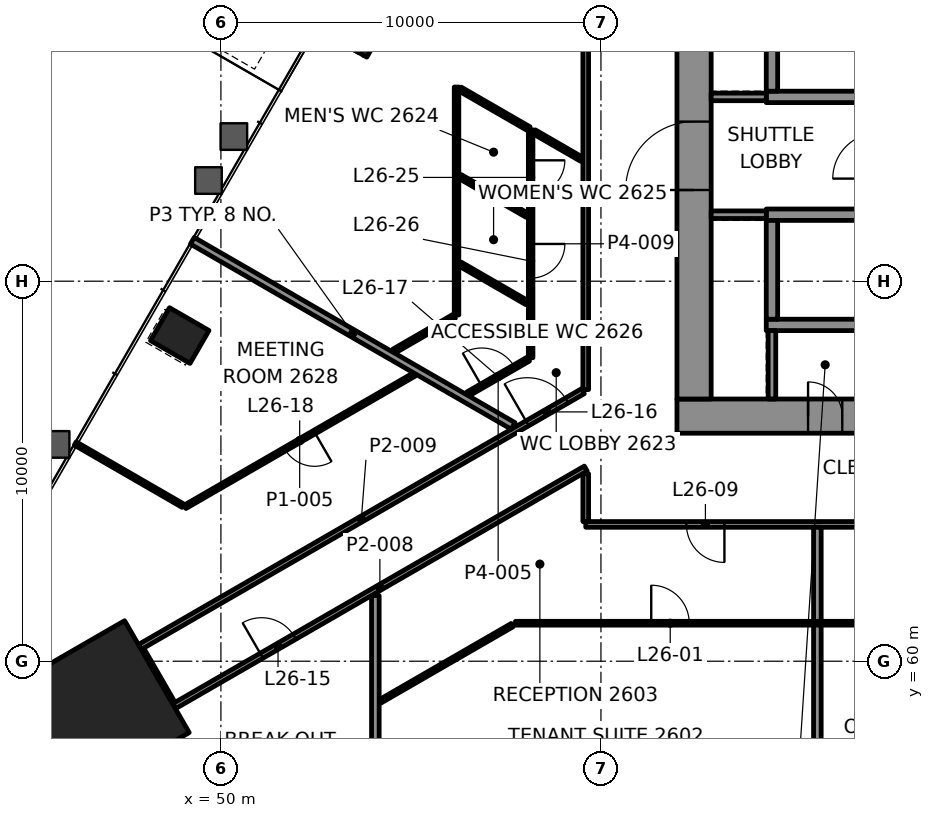
"""IFC4 building model, lengths in metres.
Left out: names, types, materials, properties, quantities, classifications, styles, units other than length and angle.
Written with IfcOpenShell. Run it as: python <this file> out.ifc"""

import sys

from ifc_helpers import new_model, si_unit, direction, frame, frame_2d, origin, origin_2d, place, context, subcontext, project, spatial, rectangle, extrude, element, fill, save


model = new_model("IFC4")
c1 = context("Model", 3, precision=1e-05, world=origin(), true_north=direction((0.0, 1.0)))
c2 = subcontext(c1, "Body", "Model", "MODEL_VIEW")
j1 = project(units=[si_unit("LENGTHUNIT", "METRE"), si_unit("PLANEANGLEUNIT", "RADIAN")], contexts=[c1])
p1 = place(None, origin())
s1 = spatial("IfcSite", under=j1, at=p1, CompositionType="ELEMENT")
p2 = place(p1, origin())
s2 = spatial("IfcBuilding", under=s1, at=p2, CompositionType="ELEMENT")
p3 = place(p2, frame((0.0, 0.0, 115.6)))
s3 = spatial("IfcBuildingStorey", under=s2, at=p3, CompositionType="ELEMENT", Elevation=115.6)
p4 = place(p3, frame((46.844, 58.744, 0.0), z_axis=(0.0, 0.0, 1.0), x_axis=(0.5, -0.866025403784, 0.0)))
e1 = element("IfcColumn", 1, at=p4, inside=s3, PredefinedType="COLUMN", context=c2, shape_type="SweptSolid", body=[
    extrude(rectangle(XDim=3.4, YDim=3.4, at=origin_2d()), origin(), (0.0, 0.0, 1.0), 4.2),
])
for number, where, z_axis, x_axis in (
    (2, (53.569, 76.628, -0.0), (0.0, 0.0, 1.0), (-0.5, -0.866, 0.0)),
    (3, (48.917, 68.57, -0.0), (0.0, 0.0, 1.0), (-0.5, -0.866, 0.0)),
):
    element("IfcColumn", number, at=place(p3, frame(where, z_axis=z_axis, x_axis=x_axis)), inside=s3, PredefinedType="COLUMN", context=c2, shape_type="SweptSolid", body=[
        extrude(rectangle(XDim=1.0, YDim=1.2, at=origin_2d()), origin(), (0.0, 0.0, 1.0), 4.2),
    ])
p5 = place(p3, frame((62.0, 66.45, 0.0), z_axis=(0.0, 0.0, 1.0), x_axis=(1.0, 0.0, 0.0)))
e4 = element("IfcWall", 4, at=p5, inside=s3, PredefinedType="SHEAR", context=c2, shape_type="SweptSolid", body=[
    extrude(rectangle(XDim=26.0, YDim=0.9, at=frame_2d((13.0, 0.0))), origin(), (0.0, 0.0, 1.0), 4.0),
])
p6 = place(p5, frame((3.45, 0.0, 0.0)))
e5 = element("IfcOpeningElement", 5, at=p6, cuts=e4, PredefinedType="OPENING", context=c2, shape_type="SweptSolid", body=[
    extrude(rectangle(XDim=0.9, YDim=2.1, at=frame_2d((0.45, 1.05))), frame((0.0, 0.46, 0.0), z_axis=(0.0, -1.0, 0.0), x_axis=(1.0, 0.0, 0.0)), (0.0, 0.0, 1.0), 0.92),
])
p7 = place(p5, frame((5.637, 0.0, 0.0)))
e6 = element("IfcOpeningElement", 6, at=p7, cuts=e4, PredefinedType="OPENING", context=c2, shape_type="SweptSolid", body=[
    extrude(rectangle(XDim=0.9, YDim=2.1, at=frame_2d((0.45, 1.05))), frame((0.0, 0.46, 0.0), z_axis=(0.0, -1.0, 0.0), x_axis=(1.0, 0.0, 0.0)), (0.0, 0.0, 1.0), 0.92),
])
p8 = place(p5, frame((7.212, 0.0, 0.0)))
e7 = element("IfcOpeningElement", 7, at=p8, cuts=e4, PredefinedType="OPENING", context=c2, shape_type="SweptSolid", body=[
    extrude(rectangle(XDim=0.9, YDim=2.1, at=frame_2d((0.45, 1.05))), frame((0.0, 0.46, 0.0), z_axis=(0.0, -1.0, 0.0), x_axis=(1.0, 0.0, 0.0)), (0.0, 0.0, 1.0), 0.92),
])
p9 = place(p5, frame((8.999, 0.0, 0.0)))
e8 = element("IfcOpeningElement", 8, at=p9, cuts=e4, PredefinedType="OPENING", context=c2, shape_type="SweptSolid", body=[
    extrude(rectangle(XDim=0.9, YDim=2.1, at=frame_2d((0.45, 1.05))), frame((0.0, 0.46, 0.0), z_axis=(0.0, -1.0, 0.0), x_axis=(1.0, 0.0, 0.0)), (0.0, 0.0, 1.0), 0.92),
])
p10 = place(p5, frame((17.324, 0.0, 0.0)))
e9 = element("IfcOpeningElement", 9, at=p10, cuts=e4, PredefinedType="OPENING", context=c2, shape_type="SweptSolid", body=[
    extrude(rectangle(XDim=0.9, YDim=2.1, at=frame_2d((0.45, 1.05))), frame((0.0, 0.46, 0.0), z_axis=(0.0, -1.0, 0.0), x_axis=(1.0, 0.0, 0.0)), (0.0, 0.0, 1.0), 0.92),
])
p11 = place(p3, frame((62.45, 66.9, 0.0), z_axis=(0.0, 0.0, 1.0), x_axis=(0.0, 1.0, 0.0)))
e10 = element("IfcWall", 10, at=p11, inside=s3, PredefinedType="SHEAR", context=c2, shape_type="SweptSolid", body=[
    extrude(rectangle(XDim=16.2, YDim=0.9, at=frame_2d((8.1, 0.0))), origin(), (0.0, 0.0, 1.0), 4.0),
])
p12 = place(p11, frame((5.5, 0.0, 0.0)))
e11 = element("IfcOpeningElement", 11, at=p12, cuts=e10, PredefinedType="OPENING", context=c2, shape_type="SweptSolid", body=[
    extrude(rectangle(XDim=1.8, YDim=2.1, at=frame_2d((0.9, 1.05))), frame((0.0, 0.46, 0.0), z_axis=(0.0, -1.0, 0.0), x_axis=(1.0, 0.0, 0.0)), (0.0, 0.0, 1.0), 0.92),
])
for number, where, z_axis, x_axis in (
    (12, (64.35, 68.85, 0.0), (0.0, 0.0, 1.0), (1.0, 0.0, 0.0)),
    (13, (64.35, 71.75, 0.0), (0.0, 0.0, 1.0), (1.0, 0.0, 0.0)),
    (14, (64.35, 74.85, 0.0), (0.0, 0.0, 1.0), (1.0, 0.0, 0.0)),
):
    element("IfcWall", number, at=place(p3, frame(where, z_axis=z_axis, x_axis=x_axis)), inside=s3, PredefinedType="SHEAR", context=c2, shape_type="SweptSolid", body=[
        extrude(rectangle(XDim=3.1, YDim=0.3, at=frame_2d((1.55, 0.0))), origin(), (0.0, 0.0, 1.0), 4.0),
    ])
for number, where, z_axis, x_axis in (
    (15, (64.5, 69.0, 0.0), (0.0, 0.0, 1.0), (0.0, 1.0, 0.0)),
    (16, (64.5, 75.0, 0.0), (0.0, 0.0, 1.0), (0.0, 1.0, 0.0)),
):
    element("IfcWall", number, at=place(p3, frame(where, z_axis=z_axis, x_axis=x_axis)), inside=s3, PredefinedType="SHEAR", context=c2, shape_type="SweptSolid", body=[
        extrude(rectangle(XDim=2.6, YDim=0.3, at=frame_2d((1.3, 0.0))), origin(), (0.0, 0.0, 1.0), 4.0),
    ])
p13 = place(p3, frame((57.751, 61.0, 0.0), z_axis=(0.0, 0.0, 1.0), x_axis=(1.0, 0.0, 0.0)))
e17 = element("IfcWall", 17, at=p13, inside=s3, PredefinedType="PARTITIONING", context=c2, shape_type="SweptSolid", body=[
    extrude(rectangle(XDim=33.533, YDim=0.1, at=frame_2d((16.766, 0.0))), origin(), (0.0, 0.0, 1.0), 3.4),
])
p14 = place(p13, frame((3.572, 0.0, 0.0)))
e18 = element("IfcOpeningElement", 18, at=p14, cuts=e17, PredefinedType="OPENING", context=c2, shape_type="SweptSolid", body=[
    extrude(rectangle(XDim=1.0, YDim=2.1, at=frame_2d((0.5, 1.05))), frame((0.0, 0.06, 0.0), z_axis=(0.0, -1.0, 0.0), x_axis=(1.0, 0.0, 0.0)), (0.0, 0.0, 1.0), 0.12),
])
p15 = place(p13, frame((9.822, 0.0, 0.0)))
e19 = element("IfcOpeningElement", 19, at=p15, cuts=e17, PredefinedType="OPENING", context=c2, shape_type="SweptSolid", body=[
    extrude(rectangle(XDim=0.9, YDim=2.1, at=frame_2d((0.45, 1.05))), frame((0.0, 0.06, 0.0), z_axis=(0.0, -1.0, 0.0), x_axis=(1.0, 0.0, 0.0)), (0.0, 0.0, 1.0), 0.12),
])
p16 = place(p13, frame((14.472, 0.0, 0.0)))
e20 = element("IfcOpeningElement", 20, at=p16, cuts=e17, PredefinedType="OPENING", context=c2, shape_type="SweptSolid", body=[
    extrude(rectangle(XDim=0.9, YDim=2.1, at=frame_2d((0.45, 1.05))), frame((0.0, 0.06, 0.0), z_axis=(0.0, -1.0, 0.0), x_axis=(1.0, 0.0, 0.0)), (0.0, 0.0, 1.0), 0.12),
])
p17 = place(p13, frame((19.124, 0.0, 0.0)))
e21 = element("IfcOpeningElement", 21, at=p17, cuts=e17, PredefinedType="OPENING", context=c2, shape_type="SweptSolid", body=[
    extrude(rectangle(XDim=0.9, YDim=2.1, at=frame_2d((0.45, 1.05))), frame((0.0, 0.06, 0.0), z_axis=(0.0, -1.0, 0.0), x_axis=(1.0, 0.0, 0.0)), (0.0, 0.0, 1.0), 0.12),
])
p18 = place(p13, frame((24.361, 0.0, 0.0)))
e22 = element("IfcOpeningElement", 22, at=p18, cuts=e17, PredefinedType="OPENING", context=c2, shape_type="SweptSolid", body=[
    extrude(rectangle(XDim=0.9, YDim=2.1, at=frame_2d((0.45, 1.05))), frame((0.0, 0.06, 0.0), z_axis=(0.0, -1.0, 0.0), x_axis=(1.0, 0.0, 0.0)), (0.0, 0.0, 1.0), 0.12),
])
p19 = place(p13, frame((30.073, 0.0, 0.0)))
e23 = element("IfcOpeningElement", 23, at=p19, cuts=e17, PredefinedType="OPENING", context=c2, shape_type="SweptSolid", body=[
    extrude(rectangle(XDim=0.9, YDim=2.1, at=frame_2d((0.45, 1.05))), frame((0.0, 0.06, 0.0), z_axis=(0.0, -1.0, 0.0), x_axis=(1.0, 0.0, 0.0)), (0.0, 0.0, 1.0), 0.12),
])
p20 = place(p3, frame((90.399, 63.6, 0.0), z_axis=(0.0, 0.0, 1.0), x_axis=(-1.0, 0.0, 0.0)))
e24 = element("IfcWall", 24, at=p20, inside=s3, PredefinedType="PARTITIONING", context=c2, shape_type="SweptSolid", body=[
    extrude(rectangle(XDim=30.799, YDim=0.15, at=frame_2d((15.4, 0.0))), origin(), (0.0, 0.0, 1.0), 3.4),
])
p21 = place(p20, frame((4.975, 0.0, 0.0)))
e25 = element("IfcOpeningElement", 25, at=p21, cuts=e24, PredefinedType="OPENING", context=c2, shape_type="SweptSolid", body=[
    extrude(rectangle(XDim=1.0, YDim=2.1, at=frame_2d((0.5, 1.05))), frame((0.0, 0.085, 0.0), z_axis=(0.0, -1.0, 0.0), x_axis=(1.0, 0.0, 0.0)), (0.0, 0.0, 1.0), 0.17),
])
p22 = place(p20, frame((17.226, 0.0, 0.0)))
e26 = element("IfcOpeningElement", 26, at=p22, cuts=e24, PredefinedType="OPENING", context=c2, shape_type="SweptSolid", body=[
    extrude(rectangle(XDim=1.0, YDim=2.1, at=frame_2d((0.5, 1.05))), frame((0.0, 0.085, 0.0), z_axis=(0.0, -1.0, 0.0), x_axis=(1.0, 0.0, 0.0)), (0.0, 0.0, 1.0), 0.17),
])
p23 = place(p20, frame((27.151, 0.0, 0.0)))
e27 = element("IfcOpeningElement", 27, at=p23, cuts=e24, PredefinedType="OPENING", context=c2, shape_type="SweptSolid", body=[
    extrude(rectangle(XDim=1.0, YDim=2.1, at=frame_2d((0.5, 1.05))), frame((0.0, 0.085, 0.0), z_axis=(0.0, -1.0, 0.0), x_axis=(1.0, 0.0, 0.0)), (0.0, 0.0, 1.0), 0.17),
])
p24 = place(p3, frame((54.189, 58.944, 0.0), z_axis=(0.0, 0.0, 1.0), x_axis=(0.866025502096, 0.499999829719, 0.0)))
e28 = element("IfcWall", 28, at=p24, inside=s3, PredefinedType="PARTITIONING", context=c2, shape_type="SweptSolid", body=[
    extrude(rectangle(XDim=4.013, YDim=0.1, at=frame_2d((2.006, 0.0))), origin(), (0.0, 0.0, 1.0), 3.4),
])
p25 = place(p3, frame((48.766, 58.815, 0.0), z_axis=(0.0, 0.0, 1.0), x_axis=(0.866028284225, 0.499995010897, 0.0)))
e29 = element("IfcWall", 29, at=p25, inside=s3, PredefinedType="PARTITIONING", context=c2, shape_type="SweptSolid", body=[
    extrude(rectangle(XDim=12.51, YDim=0.15, at=frame_2d((6.255, 0.0))), origin(), (0.0, 0.0, 1.0), 3.247),
])
p26 = place(p25, frame((2.66, 0.0, 0.0)))
e30 = element("IfcOpeningElement", 30, at=p26, cuts=e29, PredefinedType="OPENING", context=c2, shape_type="SweptSolid", body=[
    extrude(rectangle(XDim=1.0, YDim=2.1, at=frame_2d((0.5, 1.05))), frame((0.0, 0.085, 0.0), z_axis=(0.0, -1.0, 0.0), x_axis=(1.0, 0.0, 0.0)), (0.0, 0.0, 1.0), 0.17),
])
p27 = place(p3, frame((47.866, 60.374, 0.0), z_axis=(0.0, 0.0, 1.0), x_axis=(0.866031566243, 0.499989326157, 0.0)))
e31 = element("IfcWall", 31, at=p27, inside=s3, PredefinedType="PARTITIONING", context=c2, shape_type="SweptSolid", body=[
    extrude(rectangle(XDim=13.462, YDim=0.15, at=frame_2d((6.731, 0.0))), origin(), (0.0, 0.0, 1.0), 3.4),
])
p28 = place(p27, frame((11.774, 0.0, 0.0)))
e32 = element("IfcOpeningElement", 32, at=p28, cuts=e31, PredefinedType="OPENING", context=c2, shape_type="SweptSolid", body=[
    extrude(rectangle(XDim=1.2, YDim=2.1, at=frame_2d((0.6, 1.05))), frame((0.0, 0.085, 0.0), z_axis=(0.0, -1.0, 0.0), x_axis=(1.0, 0.0, 0.0)), (0.0, 0.0, 1.0), 0.17),
])
p29 = place(p3, frame((56.501, 67.033, 0.0), z_axis=(0.0, 0.0, 1.0), x_axis=(0.866023842607, 0.500002704028, 0.0)))
e33 = element("IfcWall", 33, at=p29, inside=s3, PredefinedType="PARTITIONING", context=c2, shape_type="SweptSolid", body=[
    extrude(rectangle(XDim=1.835, YDim=0.12, at=frame_2d((0.917, 0.0))), origin(), (0.0, 0.0, 1.0), 3.4),
])
p30 = place(p29, frame((0.417, 0.0, 0.0)))
e34 = element("IfcOpeningElement", 34, at=p30, cuts=e33, PredefinedType="OPENING", context=c2, shape_type="SweptSolid", body=[
    extrude(rectangle(XDim=1.0, YDim=2.1, at=frame_2d((0.5, 1.05))), frame((0.0, 0.07, 0.0), z_axis=(0.0, -1.0, 0.0), x_axis=(1.0, 0.0, 0.0)), (0.0, 0.0, 1.0), 0.14),
])
p31 = place(p3, frame((55.09, 67.547, 0.0), z_axis=(0.0, 0.0, 1.0), x_axis=(-0.8660245535, -0.500001472733, 0.0)))
e35 = element("IfcWall", 35, at=p31, inside=s3, PredefinedType="PARTITIONING", context=c2, shape_type="SweptSolid", body=[
    extrude(rectangle(XDim=6.968, YDim=0.1, at=frame_2d((3.484, 0.0))), origin(), (0.0, 0.0, 1.0), 3.4),
])
p32 = place(p31, frame((3.034, 0.0, 0.0)))
e36 = element("IfcOpeningElement", 36, at=p32, cuts=e35, PredefinedType="OPENING", context=c2, shape_type="SweptSolid", body=[
    extrude(rectangle(XDim=0.9, YDim=2.1, at=frame_2d((0.45, 1.05))), frame((0.0, 0.06, 0.0), z_axis=(0.0, -1.0, 0.0), x_axis=(1.0, 0.0, 0.0)), (0.0, 0.0, 1.0), 0.12),
])
p33 = place(p3, frame((54.551, 68.159, 0.0), z_axis=(0.0, 0.0, 1.0), x_axis=(0.866023842607, 0.500002704028, 0.0)))
e37 = element("IfcWall", 37, at=p33, inside=s3, PredefinedType="PARTITIONING", context=c2, shape_type="SweptSolid", body=[
    extrude(rectangle(XDim=1.835, YDim=0.12, at=frame_2d((0.917, 0.0))), origin(), (0.0, 0.0, 1.0), 3.4),
])
p34 = place(p3, frame((65.695, 56.226, 0.0), z_axis=(0.0, 0.0, 1.0), x_axis=(0.0, 1.0, 0.0)))
e38 = element("IfcWall", 38, at=p34, inside=s3, PredefinedType="PARTITIONING", context=c2, shape_type="SweptSolid", body=[
    extrude(rectangle(XDim=4.724, YDim=0.2, at=frame_2d((2.362, 0.0))), origin(), (0.0, 0.0, 1.0), 3.4),
])
p35 = place(p3, frame((59.6, 63.675, 0.0), z_axis=(0.0, 0.0, 1.0), x_axis=(0.0, 1.0, 0.0)))
e39 = element("IfcWall", 39, at=p35, inside=s3, PredefinedType="PARTITIONING", context=c2, shape_type="SweptSolid", body=[
    extrude(rectangle(XDim=1.258, YDim=0.15, at=frame_2d((0.629, 0.0))), origin(), (0.0, 0.0, 1.0), 3.247),
])
p36 = place(p3, frame((59.6, 67.148, 0.0), z_axis=(0.0, 0.0, 1.0), x_axis=(0.0, 1.0, 0.0)))
e40 = element("IfcWall", 40, at=p36, inside=s3, PredefinedType="PARTITIONING", context=c2, shape_type="SweptSolid", body=[
    extrude(rectangle(XDim=19.251, YDim=0.15, at=frame_2d((9.626, 0.0))), origin(), (0.0, 0.0, 1.0), 3.4),
])
p37 = place(p3, frame((58.15, 73.984, 0.0), z_axis=(0.0, 0.0, 1.0), x_axis=(0.0, -1.0, 0.0)))
e41 = element("IfcWall", 41, at=p37, inside=s3, PredefinedType="PARTITIONING", context=c2, shape_type="SweptSolid", body=[
    extrude(rectangle(XDim=5.999, YDim=0.12, at=frame_2d((3.0, 0.0))), origin(), (0.0, 0.0, 1.0), 3.4),
])
p38 = place(p37, frame((0.803, 0.0, 0.0)))
e42 = element("IfcOpeningElement", 42, at=p38, cuts=e41, PredefinedType="OPENING", context=c2, shape_type="SweptSolid", body=[
    extrude(rectangle(XDim=0.9, YDim=2.1, at=frame_2d((0.45, 1.05))), frame((0.0, 0.07, 0.0), z_axis=(0.0, -1.0, 0.0), x_axis=(1.0, 0.0, 0.0)), (0.0, 0.0, 1.0), 0.14),
])
p39 = place(p37, frame((3.003, 0.0, 0.0)))
e43 = element("IfcOpeningElement", 43, at=p39, cuts=e41, PredefinedType="OPENING", context=c2, shape_type="SweptSolid", body=[
    extrude(rectangle(XDim=0.9, YDim=2.1, at=frame_2d((0.45, 1.05))), frame((0.0, 0.07, 0.0), z_axis=(0.0, -1.0, 0.0), x_axis=(1.0, 0.0, 0.0)), (0.0, 0.0, 1.0), 0.14),
])
p40 = place(p3, frame((56.2, 69.111, 0.0), z_axis=(0.0, 0.0, 1.0), x_axis=(0.0, 1.0, 0.0)))
e44 = element("IfcWall", 44, at=p40, inside=s3, PredefinedType="PARTITIONING", context=c2, shape_type="SweptSolid", body=[
    extrude(rectangle(XDim=5.999, YDim=0.12, at=frame_2d((2.999, 0.0))), origin(), (0.0, 0.0, 1.0), 3.4),
])
p41 = place(p3, frame((54.064, 54.666, 0.0), z_axis=(0.0, 0.0, 1.0), x_axis=(0.0, 1.0, 0.0)))
e45 = element("IfcWall", 45, at=p41, inside=s3, PredefinedType="PARTITIONING", context=c2, shape_type="SweptSolid", body=[
    extrude(rectangle(XDim=7.06, YDim=0.2, at=frame_2d((3.53, 0.0))), origin(), (0.0, 0.0, 1.0), 3.4),
])
p42 = place(p3, frame((48.728, 58.88, 0.0), z_axis=(0.0, 0.0, 1.0), x_axis=(-0.500008692254, 0.866020385251, 0.0)))
e46 = element("IfcWall", 46, at=p42, inside=s3, PredefinedType="PARTITIONING", context=c2, shape_type="SweptSolid", body=[
    extrude(rectangle(XDim=1.649, YDim=0.15, at=frame_2d((0.824, 0.0))), origin(), (0.0, 0.0, 1.0), 3.247),
])
p43 = place(p3, frame((59.49, 73.21, 0.0), z_axis=(0.0, 0.0, 1.0), x_axis=(-0.86596595808, 0.500102948848, 0.0)))
e47 = element("IfcWall", 47, at=p43, inside=s3, PredefinedType="PARTITIONING", context=c2, shape_type="SweptSolid", body=[
    extrude(rectangle(XDim=1.444, YDim=0.12, at=frame_2d((0.722, 0.0))), origin(), (0.0, 0.0, 1.0), 3.4),
])
for number, where, z_axis, x_axis in (
    (48, (58.055, 71.736, 0.0), (0.0, 0.0, 1.0), (-0.866, 0.5, 0.0)),
    (49, (58.055, 69.434, 0.0), (0.0, 0.0, 1.0), (-0.866, 0.5, 0.0)),
):
    element("IfcWall", number, at=place(p3, frame(where, z_axis=z_axis, x_axis=x_axis)), inside=s3, PredefinedType="PARTITIONING", context=c2, shape_type="SweptSolid", body=[
        extrude(rectangle(XDim=2.033, YDim=0.12, at=frame_2d((1.017, 0.0))), origin(), (0.0, 0.0, 1.0), 3.4),
    ])
p44 = place(p3, frame((57.689, 66.191, 0.0), z_axis=(0.0, 0.0, 1.0), x_axis=(-0.866022484486, 0.500005056339, 0.0)))
e50 = element("IfcWall", 50, at=p44, inside=s3, PredefinedType="PARTITIONING", context=c2, shape_type="SweptSolid", body=[
    extrude(rectangle(XDim=9.747, YDim=0.2, at=frame_2d((4.873, 0.0))), origin(), (0.0, 0.0, 1.0), 3.165),
])
p45 = place(p3, frame((49.005, 64.091, 0.0), z_axis=(0.0, 0.0, 1.0), x_axis=(-0.866005637992, 0.500034233794, 0.0)))
e51 = element("IfcWall", 51, at=p45, inside=s3, PredefinedType="PARTITIONING", context=c2, shape_type="SweptSolid", body=[
    extrude(rectangle(XDim=3.276, YDim=0.1, at=frame_2d((1.638, 0.0))), origin(), (0.0, 0.0, 1.0), 3.4),
])
p46 = place(p3, frame((58.105, 74.01, 0.0), z_axis=(0.0, 0.0, 1.0), x_axis=(-0.866028046028, 0.499995423472, 0.0)))
e52 = element("IfcWall", 52, at=p46, inside=s3, PredefinedType="PARTITIONING", context=c2, shape_type="SweptSolid", body=[
    extrude(rectangle(XDim=2.09, YDim=0.12, at=frame_2d((1.045, 0.0))), origin(), (0.0, 0.0, 1.0), 3.4),
])
p47 = place(p3, frame((65.695, 61.05, 0.0), z_axis=(0.0, 0.0, 1.0), x_axis=(0.0, 1.0, 0.0)))
e53 = element("IfcWall", 53, at=p47, inside=s3, PredefinedType="PARTITIONING", context=c2, shape_type="SweptSolid", body=[
    extrude(rectangle(XDim=2.475, YDim=0.2, at=frame_2d((1.237, 0.0))), origin(), (0.0, 0.0, 1.0), 3.4),
])
p48 = place(p3, frame((49.18, 77.026, 0.0), z_axis=(0.0, 0.0, 1.0), x_axis=(0.866008176907, -0.50002983664, 0.0)))
e54 = element("IfcWall", 54, at=p48, inside=s3, PredefinedType="SOLIDWALL", context=c2, shape_type="SweptSolid", body=[
    extrude(rectangle(XDim=2.2, YDim=0.8, at=frame_2d((1.1, 0.0))), origin(), (0.0, 0.0, 1.0), 0.9),
])
for number, where, z_axis, x_axis in (
    (55, (62.9, 71.75, 0.0), (0.0, 0.0, 1.0), (1.0, 0.0, 0.0)),
    (56, (62.9, 74.85, 0.0), (0.0, 0.0, 1.0), (1.0, 0.0, 0.0)),
):
    element("IfcWall", number, at=place(p3, frame(where, z_axis=z_axis, x_axis=x_axis)), inside=s3, PredefinedType="PARTITIONING", context=c2, shape_type="SweptSolid", body=[
        extrude(rectangle(XDim=1.45, YDim=0.2, at=frame_2d((0.725, 0.0))), origin(), (0.0, 0.0, 1.0), 4.0),
    ])
p49 = place(p3, frame((64.5, 66.9, 0.0), z_axis=(0.0, 0.0, 1.0), x_axis=(0.0, 1.0, 0.0)))
e57 = element("IfcWall", 57, at=p49, inside=s3, PredefinedType="PARTITIONING", context=c2, shape_type="SweptSolid", body=[
    extrude(rectangle(XDim=1.8, YDim=0.2, at=frame_2d((0.9, 0.0))), origin(), (0.0, 0.0, 1.0), 4.0),
])
p50 = place(p14, origin())
e58 = element("IfcDoor", 58, at=p50, inside=s3, OperationType="SINGLE_SWING_LEFT", PredefinedType="DOOR", context=c2, shape_type="SweptSolid", body=[
    extrude(rectangle(XDim=1.0, YDim=2.1, at=frame_2d((0.5, 1.05))), frame((0.0, 0.025, 0.0), z_axis=(0.0, -1.0, 0.0), x_axis=(1.0, 0.0, 0.0)), (0.0, 0.0, 1.0), 0.05),
])
fill(e18, e58)
p51 = place(p23, origin())
e59 = element("IfcDoor", 59, at=p51, inside=s3, OperationType="SINGLE_SWING_LEFT", PredefinedType="DOOR", context=c2, shape_type="SweptSolid", body=[
    extrude(rectangle(XDim=1.0, YDim=2.1, at=frame_2d((0.5, 1.05))), frame((0.0, 0.025, 0.0), z_axis=(0.0, -1.0, 0.0), x_axis=(1.0, 0.0, 0.0)), (0.0, 0.0, 1.0), 0.05),
])
fill(e27, e59)
p52 = place(p26, origin())
e60 = element("IfcDoor", 60, at=p52, inside=s3, OperationType="SINGLE_SWING_RIGHT", PredefinedType="DOOR", context=c2, shape_type="SweptSolid", body=[
    extrude(rectangle(XDim=1.0, YDim=2.1, at=frame_2d((0.5, 1.05))), frame((0.0, 0.025, 0.0), z_axis=(0.0, -1.0, 0.0), x_axis=(1.0, 0.0, 0.0)), (0.0, 0.0, 1.0), 0.05),
])
fill(e30, e60)
p53 = place(p28, origin())
e61 = element("IfcDoor", 61, at=p53, inside=s3, OperationType="DOUBLE_DOOR_SINGLE_SWING", PredefinedType="DOOR", context=c2, shape_type="SweptSolid", body=[
    extrude(rectangle(XDim=1.2, YDim=2.1, at=frame_2d((0.6, 1.05))), frame((0.0, 0.025, 0.0), z_axis=(0.0, -1.0, 0.0), x_axis=(1.0, 0.0, 0.0)), (0.0, 0.0, 1.0), 0.05),
])
fill(e32, e61)
p54 = place(p30, origin())
e62 = element("IfcDoor", 62, at=p54, inside=s3, OperationType="SINGLE_SWING_LEFT", PredefinedType="DOOR", context=c2, shape_type="SweptSolid", body=[
    extrude(rectangle(XDim=1.0, YDim=2.1, at=frame_2d((0.5, 1.05))), frame((0.0, 0.025, 0.0), z_axis=(0.0, -1.0, 0.0), x_axis=(1.0, 0.0, 0.0)), (0.0, 0.0, 1.0), 0.05),
])
fill(e34, e62)
p55 = place(p32, origin())
e63 = element("IfcDoor", 63, at=p55, inside=s3, OperationType="SINGLE_SWING_RIGHT", PredefinedType="DOOR", context=c2, shape_type="SweptSolid", body=[
    extrude(rectangle(XDim=0.9, YDim=2.1, at=frame_2d((0.45, 1.05))), frame((0.0, 0.025, 0.0), z_axis=(0.0, -1.0, 0.0), x_axis=(1.0, 0.0, 0.0)), (0.0, 0.0, 1.0), 0.05),
])
fill(e36, e63)
p56 = place(p38, origin())
e64 = element("IfcDoor", 64, at=p56, inside=s3, OperationType="SINGLE_SWING_RIGHT", PredefinedType="DOOR", context=c2, shape_type="SweptSolid", body=[
    extrude(rectangle(XDim=0.9, YDim=2.1, at=frame_2d((0.45, 1.05))), frame((0.0, 0.025, 0.0), z_axis=(0.0, -1.0, 0.0), x_axis=(1.0, 0.0, 0.0)), (0.0, 0.0, 1.0), 0.05),
])
fill(e42, e64)
p57 = place(p39, origin())
e65 = element("IfcDoor", 65, at=p57, inside=s3, OperationType="SINGLE_SWING_LEFT", PredefinedType="DOOR", context=c2, shape_type="SweptSolid", body=[
    extrude(rectangle(XDim=0.9, YDim=2.1, at=frame_2d((0.45, 1.05))), frame((0.0, 0.025, 0.0), z_axis=(0.0, -1.0, 0.0), x_axis=(1.0, 0.0, 0.0)), (0.0, 0.0, 1.0), 0.05),
])
fill(e43, e65)
p58 = place(p12, origin())
e66 = element("IfcDoor", 66, at=p58, inside=s3, OperationType="SINGLE_SWING_LEFT", PredefinedType="DOOR", context=c2, shape_type="SweptSolid", body=[
    extrude(rectangle(XDim=1.8, YDim=2.1, at=frame_2d((0.9, 1.05))), frame((0.0, 0.17, 0.0), z_axis=(0.0, -1.0, 0.0), x_axis=(1.0, 0.0, 0.0)), (0.0, 0.0, 1.0), 0.34),
])
fill(e11, e66)
p59 = place(p6, origin())
e67 = element("IfcDoor", 67, at=p59, inside=s3, OperationType="SINGLE_SWING_LEFT", PredefinedType="DOOR", context=c2, shape_type="SweptSolid", body=[
    extrude(rectangle(XDim=0.9, YDim=2.1, at=frame_2d((0.45, 1.05))), frame((0.0, 0.17, 0.0), z_axis=(0.0, -1.0, 0.0), x_axis=(1.0, 0.0, 0.0)), (0.0, 0.0, 1.0), 0.34),
])
fill(e5, e67)
save(model, sys.argv[1])
